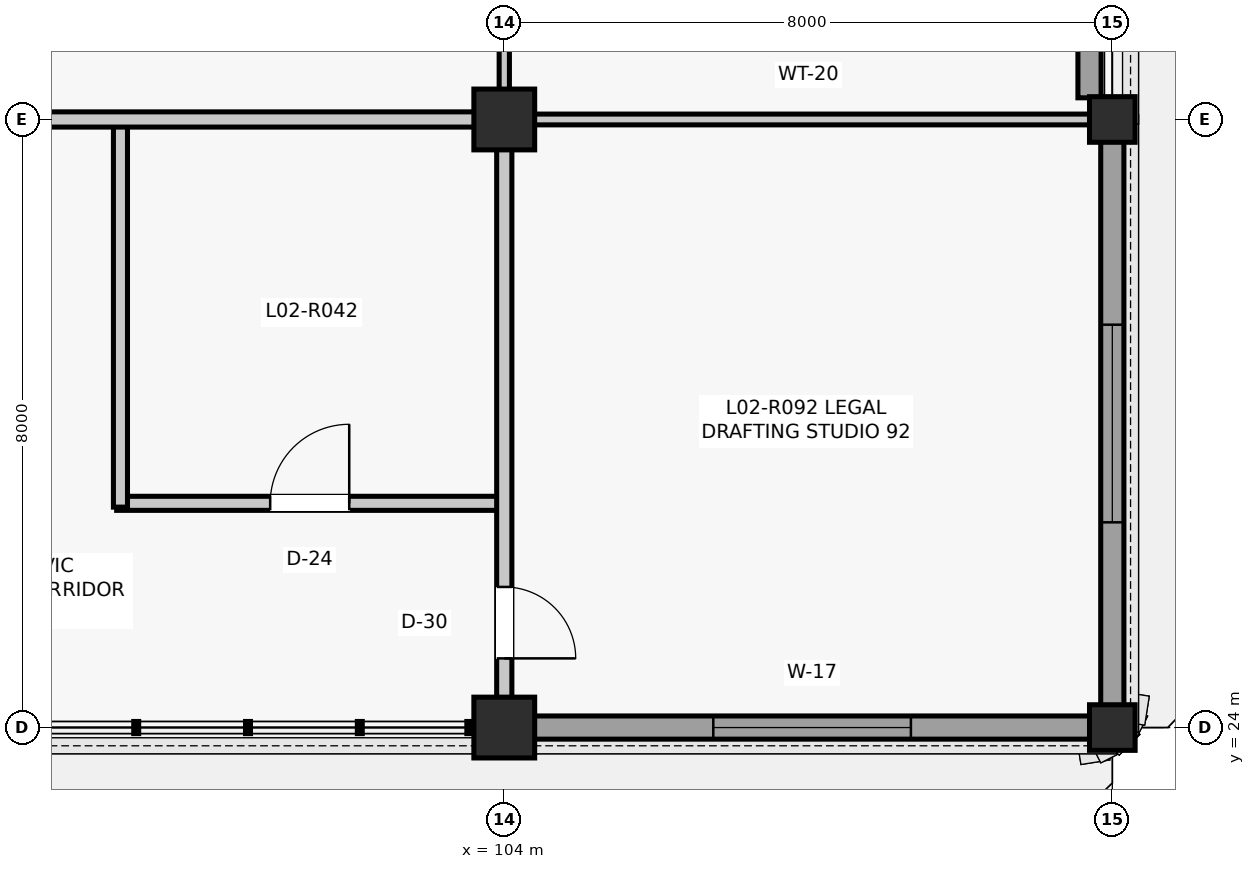
"""IFC4 building model, lengths in metres.
Left out: names, types, materials, properties, quantities, classifications, styles, units other than length and angle.
Written with IfcOpenShell. Run it as: python <this file> out.ifc"""

import sys

from ifc_helpers import new_model, si_unit, direction, frame, frame_2d, origin, origin_2d, place, context, subcontext, project, spatial, rectangle, extrude, element, fill, save


model = new_model("IFC4")
c1 = context("Model", 3, precision=1e-05, world=origin(), true_north=direction((0.0, 1.0)))
c2 = subcontext(c1, "Body", "Model", "MODEL_VIEW")
j1 = project(units=[si_unit("LENGTHUNIT", "METRE"), si_unit("PLANEANGLEUNIT", "RADIAN")], contexts=[c1])
p1 = place(None, origin())
s1 = spatial("IfcSite", under=j1, at=p1, CompositionType="ELEMENT")
p2 = place(p1, origin())
s2 = spatial("IfcBuilding", under=s1, at=p2, CompositionType="ELEMENT")
p3 = place(p2, frame((0.0, 0.0, 9.9)))
s3 = spatial("IfcBuildingStorey", under=s2, at=p3, CompositionType="ELEMENT", Elevation=9.9)
for number, where, z_axis, x_axis in (
    (1, (104.0, 24.0, 0.0), (0.0, 0.0, 1.0), (1.0, 0.0, 0.0)),
    (2, (104.0, 32.0, 0.0), (0.0, 0.0, 1.0), (1.0, 0.0, 0.0)),
):
    element("IfcColumn", number, at=place(p3, frame(where, z_axis=z_axis, x_axis=x_axis)), inside=s3, PredefinedType="COLUMN", context=c2, shape_type="SweptSolid", body=[
        extrude(rectangle(XDim=0.8, YDim=0.8, at=origin_2d()), origin(), (0.0, 0.0, 1.0), 3.96),
    ])
for number, where, z_axis, x_axis in (
    (3, (112.0, 24.0, 0.0), (0.0, 0.0, 1.0), (1.0, 0.0, 0.0)),
    (4, (112.0, 32.0, 0.0), (0.0, 0.0, 1.0), (1.0, 0.0, 0.0)),
):
    element("IfcColumn", number, at=place(p3, frame(where, z_axis=z_axis, x_axis=x_axis)), inside=s3, PredefinedType="COLUMN", context=c2, shape_type="SweptSolid", body=[
        extrude(rectangle(XDim=0.6, YDim=0.6, at=origin_2d()), origin(), (0.0, 0.0, 1.0), 3.96),
    ])
p4 = place(p3, frame((104.385, 24.0, 0.0), z_axis=(0.0, 0.0, 1.0), x_axis=(1.0, 0.0, 0.0)))
e5 = element("IfcWall", 5, at=p4, inside=s3, PredefinedType="SOLIDWALL", context=c2, shape_type="SweptSolid", body=[
    extrude(rectangle(XDim=7.33, YDim=0.305, at=frame_2d((3.665, 0.0))), origin(), (0.0, 0.0, 1.0), 3.284),
])
p5 = place(p4, frame((2.365, 0.0, 1.35)))
e6 = element("IfcOpeningElement", 6, at=p5, cuts=e5, PredefinedType="OPENING", context=c2, shape_type="SweptSolid", body=[
    extrude(rectangle(XDim=2.6, YDim=1.4, at=frame_2d((1.3, 0.7))), frame((0.0, 0.162, 0.0), z_axis=(0.0, -1.0, 0.0), x_axis=(1.0, 0.0, 0.0)), (0.0, 0.0, 1.0), 0.325),
])
p6 = place(p3, frame((112.0, 24.285, 0.0), z_axis=(0.0, 0.0, 1.0), x_axis=(0.0, 1.0, 0.0)))
e7 = element("IfcWall", 7, at=p6, inside=s3, PredefinedType="SOLIDWALL", context=c2, shape_type="SweptSolid", body=[
    extrude(rectangle(XDim=7.43, YDim=0.305, at=frame_2d((3.715, 0.0))), origin(), (0.0, 0.0, 1.0), 3.347),
])
p7 = place(p6, frame((2.415, 0.0, 1.35)))
e8 = element("IfcOpeningElement", 8, at=p7, cuts=e7, PredefinedType="OPENING", context=c2, shape_type="SweptSolid", body=[
    extrude(rectangle(XDim=2.6, YDim=1.4, at=frame_2d((1.3, 0.7))), frame((0.0, 0.162, 0.0), z_axis=(0.0, -1.0, 0.0), x_axis=(1.0, 0.0, 0.0)), (0.0, 0.0, 1.0), 0.325),
])
p8 = place(p3, frame((111.7, 32.285, 0.0), z_axis=(0.0, 0.0, 1.0), x_axis=(0.0, 1.0, 0.0)))
e9 = element("IfcWall", 9, at=p8, inside=s3, PredefinedType="SOLIDWALL", context=c2, shape_type="SweptSolid", body=[
    extrude(rectangle(XDim=7.43, YDim=0.305, at=frame_2d((3.715, 0.0))), origin(), (0.0, 0.0, 1.0), 3.28),
])
p9 = place(p3, frame((98.9, 26.95, 0.0), z_axis=(0.0, 0.0, 1.0), x_axis=(1.0, 0.0, 0.0)))
e10 = element("IfcWall", 10, at=p9, inside=s3, PredefinedType="PARTITIONING", context=c2, shape_type="SweptSolid", body=[
    extrude(rectangle(XDim=5.08, YDim=0.185, at=frame_2d((2.54, 0.0))), origin(), (0.0, 0.0, 1.0), 3.157),
])
p10 = place(p9, frame((2.02, 0.0, 0.0)))
e11 = element("IfcOpeningElement", 11, at=p10, cuts=e10, PredefinedType="OPENING", context=c2, shape_type="SweptSolid", body=[
    extrude(rectangle(XDim=1.04, YDim=2.18, at=frame_2d((0.52, 1.09))), frame((0.0, 0.103, 0.0), z_axis=(0.0, -1.0, 0.0), x_axis=(1.0, 0.0, 0.0)), (0.0, 0.0, 1.0), 0.205),
])
p11 = place(p3, frame((98.95, 26.9, 0.0), z_axis=(0.0, 0.0, 1.0), x_axis=(0.0, 1.0, 0.0)))
e12 = element("IfcWall", 12, at=p11, inside=s3, PredefinedType="PARTITIONING", context=c2, shape_type="SweptSolid", body=[
    extrude(rectangle(XDim=5.08, YDim=0.185, at=frame_2d((2.54, 0.0))), origin(), (0.0, 0.0, 1.0), 3.695),
])
p12 = place(p3, frame((104.0, 24.39, 0.0), z_axis=(0.0, 0.0, 1.0), x_axis=(0.0, 1.0, 0.0)))
e13 = element("IfcWall", 13, at=p12, inside=s3, PredefinedType="PARTITIONING", context=c2, shape_type="SweptSolid", body=[
    extrude(rectangle(XDim=7.22, YDim=0.2, at=frame_2d((3.61, 0.0))), origin(), (0.0, 0.0, 1.0), 3.157),
])
p13 = place(p12, frame((0.52, 0.0, 0.0)))
e14 = element("IfcOpeningElement", 14, at=p13, cuts=e13, PredefinedType="OPENING", context=c2, shape_type="SweptSolid", body=[
    extrude(rectangle(XDim=0.94, YDim=2.12, at=frame_2d((0.47, 1.06))), frame((0.0, 0.11, 0.0), z_axis=(0.0, -1.0, 0.0), x_axis=(1.0, 0.0, 0.0)), (0.0, 0.0, 1.0), 0.22),
])
p14 = place(p3, frame((96.0, 32.0, 0.0), z_axis=(0.0, 0.0, 1.0), x_axis=(1.0, 0.0, 0.0)))
e15 = element("IfcWall", 15, at=p14, inside=s3, PredefinedType="PARTITIONING", context=c2, shape_type="SweptSolid", body=[
    extrude(rectangle(XDim=7.61, YDim=0.2, at=frame_2d((3.805, 0.0))), origin(), (0.0, 0.0, 1.0), 3.695),
])
p15 = place(p14, frame((0.52, 0.0, 0.0)))
e16 = element("IfcOpeningElement", 16, at=p15, cuts=e15, PredefinedType="OPENING", context=c2, shape_type="SweptSolid", body=[
    extrude(rectangle(XDim=0.94, YDim=2.12, at=frame_2d((0.47, 1.06))), frame((0.0, 0.11, 0.0), z_axis=(0.0, -1.0, 0.0), x_axis=(1.0, 0.0, 0.0)), (0.0, 0.0, 1.0), 0.22),
])
p16 = place(p3, frame((104.0, 32.39, 0.0), z_axis=(0.0, 0.0, 1.0), x_axis=(0.0, 1.0, 0.0)))
e17 = element("IfcWall", 17, at=p16, inside=s3, PredefinedType="PARTITIONING", context=c2, shape_type="SweptSolid", body=[
    extrude(rectangle(XDim=7.22, YDim=0.135, at=frame_2d((3.61, 0.0))), origin(), (0.0, 0.0, 1.0), 3.227),
])
p17 = place(p3, frame((104.39, 32.0, 0.0), z_axis=(0.0, 0.0, 1.0), x_axis=(1.0, 0.0, 0.0)))
e18 = element("IfcWall", 18, at=p17, inside=s3, PredefinedType="PARTITIONING", context=c2, shape_type="SweptSolid", body=[
    extrude(rectangle(XDim=7.32, YDim=0.142, at=frame_2d((3.66, 0.0))), origin(), (0.0, 0.0, 1.0), 3.157),
])
p18 = place(p5, origin())
e19 = element("IfcWindow", 19, at=p18, inside=s3, PartitioningType="SINGLE_PANEL", PredefinedType="WINDOW", context=c2, shape_type="SweptSolid", body=[
    extrude(rectangle(XDim=2.6, YDim=1.4, at=frame_2d((1.3, 0.7))), frame((0.0, 0.03, 0.0), z_axis=(0.0, -1.0, 0.0), x_axis=(1.0, 0.0, 0.0)), (0.0, 0.0, 1.0), 0.06),
])
fill(e6, e19)
p19 = place(p7, origin())
e20 = element("IfcWindow", 20, at=p19, inside=s3, PartitioningType="SINGLE_PANEL", PredefinedType="WINDOW", context=c2, shape_type="SweptSolid", body=[
    extrude(rectangle(XDim=2.6, YDim=1.4, at=frame_2d((1.3, 0.7))), frame((0.0, 0.03, 0.0), z_axis=(0.0, -1.0, 0.0), x_axis=(1.0, 0.0, 0.0)), (0.0, 0.0, 1.0), 0.06),
])
fill(e8, e20)
p20 = place(p10, origin())
e21 = element("IfcDoor", 21, at=p20, inside=s3, OperationType="SINGLE_SWING_RIGHT", PredefinedType="DOOR", context=c2, shape_type="SweptSolid", body=[
    extrude(rectangle(XDim=1.04, YDim=2.18, at=frame_2d((0.52, 1.09))), frame((0.0, 0.025, 0.0), z_axis=(0.0, -1.0, 0.0), x_axis=(1.0, 0.0, 0.0)), (0.0, 0.0, 1.0), 0.05),
])
fill(e11, e21)
p21 = place(p13, frame((0.94, 0.0, 0.0), z_axis=(0.0, 0.0, 1.0), x_axis=(-1.0, 0.0, 0.0)))
e22 = element("IfcDoor", 22, at=p21, inside=s3, OperationType="SINGLE_SWING_LEFT", PredefinedType="DOOR", context=c2, shape_type="SweptSolid", body=[
    extrude(rectangle(XDim=0.94, YDim=2.12, at=frame_2d((0.47, 1.06))), frame((0.0, 0.025, 0.0), z_axis=(0.0, -1.0, 0.0), x_axis=(1.0, 0.0, 0.0)), (0.0, 0.0, 1.0), 0.05),
])
fill(e14, e22)
save(model, sys.argv[1])
